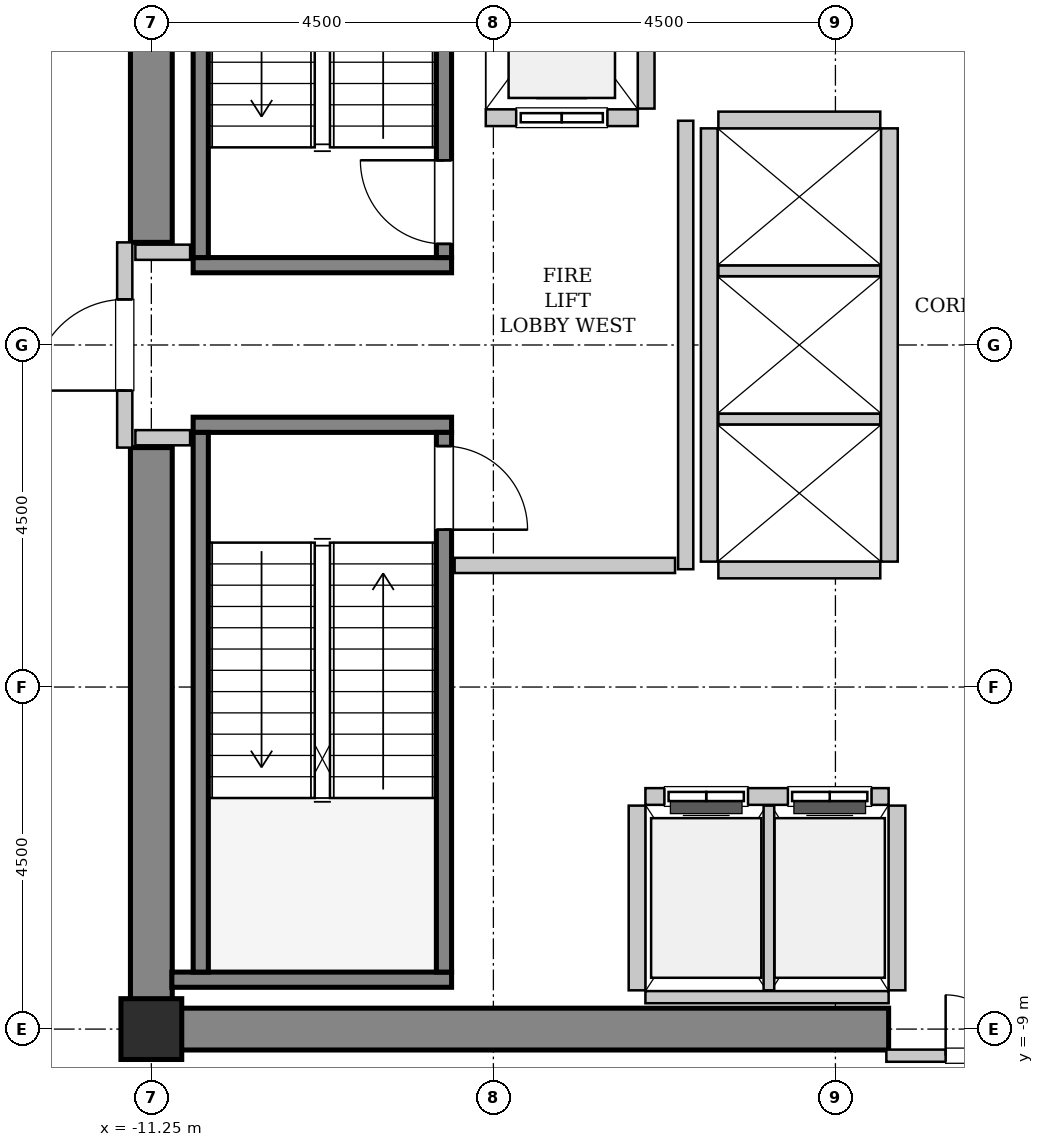
"""IFC4 building model, lengths in metres.
Left out: names, types, materials, properties, quantities, classifications, styles, units other than length and angle.
Written with IfcOpenShell. Run it as: python <this file> out.ifc"""

import sys

from ifc_helpers import new_model, si_unit, direction, frame, frame_2d, origin, origin_2d, place, context, subcontext, project, spatial, rectangle, hollow_rectangle, extrude, source, transform, mapped, element, fill, save


model = new_model("IFC4")
c1 = context("Model", 3, precision=1e-05, world=origin(), true_north=direction((0.0, 1.0)))
c2 = subcontext(c1, "Body", "Model", "MODEL_VIEW")
j1 = project(units=[si_unit("LENGTHUNIT", "METRE"), si_unit("PLANEANGLEUNIT", "RADIAN")], contexts=[c1])
p1 = place(None, origin())
s1 = spatial("IfcSite", under=j1, at=p1, CompositionType="ELEMENT")
p2 = place(p1, origin())
s2 = spatial("IfcBuilding", under=s1, at=p2, CompositionType="ELEMENT")
p3 = place(p2, frame((0.0, 0.0, 202.0)))
s3 = spatial("IfcBuildingStorey", under=s2, at=p3, CompositionType="ELEMENT", Elevation=202.0)
m1 = source(origin(), c2, "Body", "SweptSolid", [
    extrude(rectangle(XDim=9.975, YDim=0.55, at=frame_2d((4.987, 0.0))), origin(), (0.0, 0.0, 1.0), 4.6),
])
p4 = place(p3, frame((-11.525, -9.0, 0.0), z_axis=(0.0, 0.0, 1.0), x_axis=(1.0, 0.0, 0.0)))
e1 = element("IfcWall", 1, at=p4, inside=s3, PredefinedType="SHEAR", context=c2, shape_type="MappedRepresentation", body=[
    mapped(m1, transform((0.0, 0.0, 0.0), x_axis=(1.0, 0.0, 0.0), y_axis=(0.0, 1.0, 0.0), z_axis=(0.0, 0.0, 1.0), scale=1.0)),
])
m2 = source(origin(), c2, "Body", "SweptSolid", [
    extrude(rectangle(XDim=7.375, YDim=0.55, at=frame_2d((3.688, 0.0))), origin(), (0.0, 0.0, 1.0), 4.6),
])
for number, where, z_axis, x_axis in (
    (2, (-11.25, -8.725, 0.0), (0.0, 0.0, 1.0), (0.0, 1.0, 0.0)),
    (3, (-11.25, 1.35, 0.0), (0.0, 0.0, 1.0), (0.0, 1.0, 0.0)),
):
    element("IfcWall", number, at=place(p3, frame(where, z_axis=z_axis, x_axis=x_axis)), inside=s3, PredefinedType="SHEAR", context=c2, shape_type="MappedRepresentation", body=[
        mapped(m2, transform((0.0, 0.0, 0.0), x_axis=(1.0, 0.0, 0.0), y_axis=(0.0, 1.0, 0.0), z_axis=(0.0, 0.0, 1.0), scale=1.0)),
    ])
m3 = source(origin(), c2, "Body", "SweptSolid", [
    extrude(hollow_rectangle(XDim=0.8, YDim=0.8, WallThickness=0.04, InnerFilletRadius=0.04, OuterFilletRadius=0.08, at=origin_2d()), origin(), (0.0, 0.0, 1.0), 4.6),
])
p5 = place(p3, frame((-11.25, -9.0, 0.0), z_axis=(0.0, 0.0, 1.0), x_axis=(1.0, 0.0, 0.0)))
e4 = element("IfcColumn", 4, at=p5, inside=s3, PredefinedType="COLUMN", context=c2, shape_type="MappedRepresentation", body=[
    mapped(m3, transform((0.0, 0.0, 0.0), x_axis=(1.0, 0.0, 0.0), y_axis=(0.0, 1.0, 0.0), z_axis=(0.0, 0.0, 1.0), scale=1.0)),
])
m4 = source(origin(), c2, "Body", "SweptSolid", [
    extrude(rectangle(XDim=3.4, YDim=0.2, at=frame_2d((1.7, 0.0))), origin(), (0.0, 0.0, 1.0), 4.6),
])
p6 = place(p3, frame((-7.3, 1.05, 0.0), z_axis=(0.0, 0.0, 1.0), x_axis=(-1.0, 0.0, 0.0)))
e5 = element("IfcWall", 5, at=p6, inside=s3, PredefinedType="SOLIDWALL", context=c2, shape_type="MappedRepresentation", body=[
    mapped(m4, transform((0.0, 0.0, 0.0), x_axis=(1.0, 0.0, 0.0), y_axis=(0.0, 1.0, 0.0), z_axis=(0.0, 0.0, 1.0), scale=1.0)),
])
m5 = source(origin(), c2, "Body", "SweptSolid", [
    extrude(rectangle(XDim=7.1, YDim=0.2, at=frame_2d((3.55, 0.0))), origin(), (0.0, 0.0, 1.0), 4.6),
])
p7 = place(p3, frame((-7.4, 1.15, 0.0), z_axis=(0.0, 0.0, 1.0), x_axis=(0.0, 1.0, 0.0)))
e6 = element("IfcWall", 6, at=p7, inside=s3, PredefinedType="SOLIDWALL", context=c2, shape_type="MappedRepresentation", body=[
    mapped(m5, transform((0.0, 0.0, 0.0), x_axis=(1.0, 0.0, 0.0), y_axis=(0.0, 1.0, 0.0), z_axis=(0.0, 0.0, 1.0), scale=1.0)),
])
p8 = place(p7, frame((0.18, 0.0, 0.0)))
e7 = element("IfcOpeningElement", 7, at=p8, cuts=e6, PredefinedType="OPENING", context=c2, shape_type="SweptSolid", body=[
    extrude(rectangle(XDim=1.1, YDim=2.15, at=frame_2d((0.55, 1.075))), frame((0.0, 0.11, 0.0), z_axis=(0.0, -1.0, 0.0), x_axis=(1.0, 0.0, 0.0)), (0.0, 0.0, 1.0), 0.22),
])
p9 = place(p3, frame((-10.6, 1.15, 0.0), z_axis=(0.0, 0.0, 1.0), x_axis=(0.0, 1.0, 0.0)))
e8 = element("IfcWall", 8, at=p9, inside=s3, PredefinedType="SOLIDWALL", context=c2, shape_type="MappedRepresentation", body=[
    mapped(m5, transform((0.0, 0.0, 0.0), x_axis=(1.0, 0.0, 0.0), y_axis=(0.0, 1.0, 0.0), z_axis=(0.0, 0.0, 1.0), scale=1.0)),
])
p10 = place(p3, frame((-10.7, -1.05, 0.0), z_axis=(0.0, 0.0, 1.0), x_axis=(1.0, 0.0, 0.0)))
e9 = element("IfcWall", 9, at=p10, inside=s3, PredefinedType="SOLIDWALL", context=c2, shape_type="MappedRepresentation", body=[
    mapped(m4, transform((0.0, 0.0, 0.0), x_axis=(1.0, 0.0, 0.0), y_axis=(0.0, 1.0, 0.0), z_axis=(0.0, 0.0, 1.0), scale=1.0)),
])
m6 = source(origin(), c2, "Body", "SweptSolid", [
    extrude(rectangle(XDim=3.68, YDim=0.2, at=frame_2d((1.84, 0.0))), origin(), (0.0, 0.0, 1.0), 4.6),
])
p11 = place(p3, frame((-10.98, -8.35, 0.0), z_axis=(0.0, 0.0, 1.0), x_axis=(1.0, 0.0, 0.0)))
e10 = element("IfcWall", 10, at=p11, inside=s3, PredefinedType="SOLIDWALL", context=c2, shape_type="MappedRepresentation", body=[
    mapped(m6, transform((0.0, 0.0, 0.0), x_axis=(1.0, 0.0, 0.0), y_axis=(0.0, 1.0, 0.0), z_axis=(0.0, 0.0, 1.0), scale=1.0)),
])
p12 = place(p3, frame((-10.6, -1.15, 0.0), z_axis=(0.0, 0.0, 1.0), x_axis=(0.0, -1.0, 0.0)))
e11 = element("IfcWall", 11, at=p12, inside=s3, PredefinedType="SOLIDWALL", context=c2, shape_type="MappedRepresentation", body=[
    mapped(m5, transform((0.0, 0.0, 0.0), x_axis=(1.0, 0.0, 0.0), y_axis=(0.0, 1.0, 0.0), z_axis=(0.0, 0.0, 1.0), scale=1.0)),
])
p13 = place(p3, frame((-7.4, -1.15, 0.0), z_axis=(0.0, 0.0, 1.0), x_axis=(0.0, -1.0, 0.0)))
e12 = element("IfcWall", 12, at=p13, inside=s3, PredefinedType="SOLIDWALL", context=c2, shape_type="MappedRepresentation", body=[
    mapped(m5, transform((0.0, 0.0, 0.0), x_axis=(1.0, 0.0, 0.0), y_axis=(0.0, 1.0, 0.0), z_axis=(0.0, 0.0, 1.0), scale=1.0)),
])
p14 = place(p13, frame((0.18, 0.0, 0.0)))
e13 = element("IfcOpeningElement", 13, at=p14, cuts=e12, PredefinedType="OPENING", context=c2, shape_type="SweptSolid", body=[
    extrude(rectangle(XDim=1.1, YDim=2.15, at=frame_2d((0.55, 1.075))), frame((0.0, 0.11, 0.0), z_axis=(0.0, -1.0, 0.0), x_axis=(1.0, 0.0, 0.0)), (0.0, 0.0, 1.0), 0.22),
])
m7 = source(origin(), c2, "Body", "SweptSolid", [
    extrude(rectangle(XDim=2.0, YDim=0.22, at=frame_2d((1.0, 0.0))), origin(), (0.0, 0.0, 1.0), 4.335),
])
p15 = place(p3, frame((-6.85, 2.99, 0.0), z_axis=(0.0, 0.0, 1.0), x_axis=(1.0, 0.0, 0.0)))
e14 = element("IfcWall", 14, at=p15, inside=s3, PredefinedType="SOLIDWALL", context=c2, shape_type="MappedRepresentation", body=[
    mapped(m7, transform((0.0, 0.0, 0.0), x_axis=(1.0, 0.0, 0.0), y_axis=(0.0, 1.0, 0.0), z_axis=(0.0, 0.0, 1.0), scale=1.0)),
])
p16 = place(p15, frame((0.4, 0.0, 0.0)))
e15 = element("IfcOpeningElement", 15, at=p16, cuts=e14, PredefinedType="OPENING", context=c2, shape_type="SweptSolid", body=[
    extrude(rectangle(XDim=1.2, YDim=2.2, at=frame_2d((0.6, 1.1))), frame((0.0, 0.12, 0.0), z_axis=(0.0, -1.0, 0.0), x_axis=(1.0, 0.0, 0.0)), (0.0, 0.0, 1.0), 0.24),
])
m8 = source(origin(), c2, "Body", "SweptSolid", [
    extrude(rectangle(XDim=2.68, YDim=0.22, at=frame_2d((1.34, 0.0))), origin(), (0.0, 0.0, 1.0), 4.335),
])
p17 = place(p3, frame((-4.74, 3.11, 0.0), z_axis=(0.0, 0.0, 1.0), x_axis=(0.0, 1.0, 0.0)))
e16 = element("IfcWall", 16, at=p17, inside=s3, PredefinedType="SOLIDWALL", context=c2, shape_type="MappedRepresentation", body=[
    mapped(m8, transform((0.0, 0.0, 0.0), x_axis=(1.0, 0.0, 0.0), y_axis=(0.0, 1.0, 0.0), z_axis=(0.0, 0.0, 1.0), scale=1.0)),
])
m9 = source(origin(), c2, "Body", "SweptSolid", [
    extrude(rectangle(XDim=3.2, YDim=0.22, at=frame_2d((1.6, 0.0))), origin(), (0.0, 0.0, 1.0), 4.335),
])
p18 = place(p3, frame((-1.55, -5.94, 0.0), z_axis=(0.0, 0.0, 1.0), x_axis=(-1.0, 0.0, 0.0)))
e17 = element("IfcWall", 17, at=p18, inside=s3, PredefinedType="SOLIDWALL", context=c2, shape_type="MappedRepresentation", body=[
    mapped(m9, transform((0.0, 0.0, 0.0), x_axis=(1.0, 0.0, 0.0), y_axis=(0.0, 1.0, 0.0), z_axis=(0.0, 0.0, 1.0), scale=1.0)),
])
p19 = place(p18, frame((1.85, 0.0, 0.0)))
e18 = element("IfcOpeningElement", 18, at=p19, cuts=e17, PredefinedType="OPENING", context=c2, shape_type="SweptSolid", body=[
    extrude(rectangle(XDim=1.1, YDim=2.2, at=frame_2d((0.55, 1.1))), frame((0.0, 0.12, 0.0), z_axis=(0.0, -1.0, 0.0), x_axis=(1.0, 0.0, 0.0)), (0.0, 0.0, 1.0), 0.24),
])
p20 = place(p18, frame((0.225, 0.0, 0.0)))
e19 = element("IfcOpeningElement", 19, at=p20, cuts=e17, PredefinedType="OPENING", context=c2, shape_type="SweptSolid", body=[
    extrude(rectangle(XDim=1.1, YDim=2.2, at=frame_2d((0.55, 1.1))), frame((0.0, 0.12, 0.0), z_axis=(0.0, -1.0, 0.0), x_axis=(1.0, 0.0, 0.0)), (0.0, 0.0, 1.0), 0.24),
])
m10 = source(origin(), c2, "Body", "SweptSolid", [
    extrude(rectangle(XDim=3.2, YDim=0.16, at=frame_2d((1.6, 0.0))), origin(), (0.0, 0.0, 1.0), 3.225),
])
p21 = place(p3, frame((-4.75, -8.58, 0.0), z_axis=(0.0, 0.0, 1.0), x_axis=(1.0, 0.0, 0.0)))
e20 = element("IfcWall", 20, at=p21, inside=s3, PredefinedType="PARTITIONING", context=c2, shape_type="MappedRepresentation", body=[
    mapped(m10, transform((0.0, 0.0, 0.0), x_axis=(1.0, 0.0, 0.0), y_axis=(0.0, 1.0, 0.0), z_axis=(0.0, 0.0, 1.0), scale=1.0)),
])
m11 = source(origin(), c2, "Body", "SweptSolid", [
    extrude(rectangle(XDim=2.43, YDim=0.22, at=frame_2d((1.215, 0.0))), origin(), (0.0, 0.0, 1.0), 4.335),
])
p22 = place(p3, frame((-4.86, -6.06, 0.0), z_axis=(0.0, 0.0, 1.0), x_axis=(0.0, -1.0, 0.0)))
e21 = element("IfcWall", 21, at=p22, inside=s3, PredefinedType="SOLIDWALL", context=c2, shape_type="MappedRepresentation", body=[
    mapped(m11, transform((0.0, 0.0, 0.0), x_axis=(1.0, 0.0, 0.0), y_axis=(0.0, 1.0, 0.0), z_axis=(0.0, 0.0, 1.0), scale=1.0)),
])
m12 = source(origin(), c2, "Body", "SweptSolid", [
    extrude(rectangle(XDim=2.43, YDim=0.14, at=frame_2d((1.215, 0.0))), origin(), (0.0, 0.0, 1.0), 4.335),
])
p23 = place(p3, frame((-3.125, -8.49, 0.0), z_axis=(0.0, 0.0, 1.0), x_axis=(0.0, 1.0, 0.0)))
e22 = element("IfcWall", 22, at=p23, inside=s3, PredefinedType="PARTITIONING", context=c2, shape_type="MappedRepresentation", body=[
    mapped(m12, transform((0.0, 0.0, 0.0), x_axis=(1.0, 0.0, 0.0), y_axis=(0.0, 1.0, 0.0), z_axis=(0.0, 0.0, 1.0), scale=1.0)),
])
p24 = place(p3, frame((-1.44, -8.49, 0.0), z_axis=(0.0, 0.0, 1.0), x_axis=(0.0, 1.0, 0.0)))
e23 = element("IfcWall", 23, at=p24, inside=s3, PredefinedType="SOLIDWALL", context=c2, shape_type="MappedRepresentation", body=[
    mapped(m11, transform((0.0, 0.0, 0.0), x_axis=(1.0, 0.0, 0.0), y_axis=(0.0, 1.0, 0.0), z_axis=(0.0, 0.0, 1.0), scale=1.0)),
])
m13 = source(origin(), c2, "Body", "SweptSolid", [
    extrude(rectangle(XDim=5.7, YDim=0.22, at=frame_2d((2.85, 0.0))), origin(), (0.0, 0.0, 1.0), 4.335),
])
for number, where, z_axis, x_axis in (
    (24, (-1.54, -2.85, 0.0), (0.0, 0.0, 1.0), (0.0, 1.0, 0.0)),
    (25, (-3.91, 2.85, 0.0), (0.0, 0.0, 1.0), (0.0, -1.0, 0.0)),
):
    element("IfcWall", number, at=place(p3, frame(where, z_axis=z_axis, x_axis=x_axis)), inside=s3, PredefinedType="SOLIDWALL", context=c2, shape_type="MappedRepresentation", body=[
        mapped(m13, transform((0.0, 0.0, 0.0), x_axis=(1.0, 0.0, 0.0), y_axis=(0.0, 1.0, 0.0), z_axis=(0.0, 0.0, 1.0), scale=1.0)),
    ])
m14 = source(origin(), c2, "Body", "SweptSolid", [
    extrude(rectangle(XDim=2.13, YDim=0.22, at=frame_2d((1.065, 0.0))), origin(), (0.0, 0.0, 1.0), 4.335),
])
p25 = place(p3, frame((-3.79, -2.96, 0.0), z_axis=(0.0, 0.0, 1.0), x_axis=(1.0, 0.0, 0.0)))
e26 = element("IfcWall", 26, at=p25, inside=s3, PredefinedType="SOLIDWALL", context=c2, shape_type="MappedRepresentation", body=[
    mapped(m14, transform((0.0, 0.0, 0.0), x_axis=(1.0, 0.0, 0.0), y_axis=(0.0, 1.0, 0.0), z_axis=(0.0, 0.0, 1.0), scale=1.0)),
])
m15 = source(origin(), c2, "Body", "SweptSolid", [
    extrude(rectangle(XDim=2.13, YDim=0.14, at=frame_2d((1.065, 0.0))), origin(), (0.0, 0.0, 1.0), 4.335),
])
for number, where, z_axis, x_axis in (
    (27, (-3.79, -0.975, 0.0), (0.0, 0.0, 1.0), (1.0, 0.0, 0.0)),
    (28, (-3.79, 0.975, 0.0), (0.0, 0.0, 1.0), (1.0, 0.0, 0.0)),
):
    element("IfcWall", number, at=place(p3, frame(where, z_axis=z_axis, x_axis=x_axis)), inside=s3, PredefinedType="PARTITIONING", context=c2, shape_type="MappedRepresentation", body=[
        mapped(m15, transform((0.0, 0.0, 0.0), x_axis=(1.0, 0.0, 0.0), y_axis=(0.0, 1.0, 0.0), z_axis=(0.0, 0.0, 1.0), scale=1.0)),
    ])
p26 = place(p3, frame((-1.66, 2.96, 0.0), z_axis=(0.0, 0.0, 1.0), x_axis=(-1.0, 0.0, 0.0)))
e29 = element("IfcWall", 29, at=p26, inside=s3, PredefinedType="SOLIDWALL", context=c2, shape_type="MappedRepresentation", body=[
    mapped(m14, transform((0.0, 0.0, 0.0), x_axis=(1.0, 0.0, 0.0), y_axis=(0.0, 1.0, 0.0), z_axis=(0.0, 0.0, 1.0), scale=1.0)),
])
m16 = source(origin(), c2, "Body", "SweptSolid", [
    extrude(rectangle(XDim=2.7, YDim=0.2, at=frame_2d((1.35, 0.0))), origin(), (0.0, 0.0, 1.0), 3.225),
])
p27 = place(p3, frame((-11.6, -1.35, 0.0), z_axis=(0.0, 0.0, 1.0), x_axis=(0.0, 1.0, 0.0)))
e30 = element("IfcWall", 30, at=p27, inside=s3, PredefinedType="PARTITIONING", context=c2, shape_type="MappedRepresentation", body=[
    mapped(m16, transform((0.0, 0.0, 0.0), x_axis=(1.0, 0.0, 0.0), y_axis=(0.0, 1.0, 0.0), z_axis=(0.0, 0.0, 1.0), scale=1.0)),
])
p28 = place(p27, frame((0.75, 0.0, 0.0)))
e31 = element("IfcOpeningElement", 31, at=p28, cuts=e30, PredefinedType="OPENING", context=c2, shape_type="SweptSolid", body=[
    extrude(rectangle(XDim=1.2, YDim=2.15, at=frame_2d((0.6, 1.075))), frame((0.0, 0.11, 0.0), z_axis=(0.0, -1.0, 0.0), x_axis=(1.0, 0.0, 0.0)), (0.0, 0.0, 1.0), 0.22),
])
m17 = source(origin(), c2, "Body", "SweptSolid", [
    extrude(rectangle(XDim=5.9, YDim=0.2, at=frame_2d((2.95, 0.0))), origin(), (0.0, 0.0, 1.0), 4.335),
])
p29 = place(p3, frame((-4.22, -2.95, 0.0), z_axis=(0.0, 0.0, 1.0), x_axis=(0.0, 1.0, 0.0)))
e32 = element("IfcWall", 32, at=p29, inside=s3, PredefinedType="PARTITIONING", context=c2, shape_type="MappedRepresentation", body=[
    mapped(m17, transform((0.0, 0.0, 0.0), x_axis=(1.0, 0.0, 0.0), y_axis=(0.0, 1.0, 0.0), z_axis=(0.0, 0.0, 1.0), scale=1.0)),
])
m18 = source(origin(), c2, "Body", "SweptSolid", [
    extrude(rectangle(XDim=2.9, YDim=0.2, at=frame_2d((1.45, 0.0))), origin(), (0.0, 0.0, 1.0), 4.335),
])
p30 = place(p3, frame((-7.26, -2.9, 0.0), z_axis=(0.0, 0.0, 1.0), x_axis=(1.0, 0.0, 0.0)))
e33 = element("IfcWall", 33, at=p30, inside=s3, PredefinedType="PARTITIONING", context=c2, shape_type="MappedRepresentation", body=[
    mapped(m18, transform((0.0, 0.0, 0.0), x_axis=(1.0, 0.0, 0.0), y_axis=(0.0, 1.0, 0.0), z_axis=(0.0, 0.0, 1.0), scale=1.0)),
])
m19 = source(origin(), c2, "Body", "SweptSolid", [
    extrude(rectangle(XDim=0.72, YDim=0.2, at=frame_2d((0.36, 0.0))), origin(), (0.0, 0.0, 1.0), 4.335),
])
for number, where, z_axis, x_axis in (
    (34, (-11.46, 1.22, 0.0), (0.0, 0.0, 1.0), (1.0, 0.0, 0.0)),
    (35, (-11.46, -1.22, 0.0), (0.0, 0.0, 1.0), (1.0, 0.0, 0.0)),
):
    element("IfcWall", number, at=place(p3, frame(where, z_axis=z_axis, x_axis=x_axis)), inside=s3, PredefinedType="PARTITIONING", context=c2, shape_type="MappedRepresentation", body=[
        mapped(m19, transform((0.0, 0.0, 0.0), x_axis=(1.0, 0.0, 0.0), y_axis=(0.0, 1.0, 0.0), z_axis=(0.0, 0.0, 1.0), scale=1.0)),
    ])
m20 = source(origin(), c2, "Body", "SweptSolid", [
    extrude(rectangle(XDim=3.16, YDim=0.16, at=frame_2d((1.58, 0.0))), origin(), (0.0, 0.0, 1.0), 3.225),
])
p31 = place(p3, frame((-1.58, -9.35, 0.0), z_axis=(0.0, 0.0, 1.0), x_axis=(1.0, 0.0, 0.0)))
e36 = element("IfcWall", 36, at=p31, inside=s3, PredefinedType="PARTITIONING", context=c2, shape_type="MappedRepresentation", body=[
    mapped(m20, transform((0.0, 0.0, 0.0), x_axis=(1.0, 0.0, 0.0), y_axis=(0.0, 1.0, 0.0), z_axis=(0.0, 0.0, 1.0), scale=1.0)),
])
p32 = place(p31, frame((0.78, 0.0, 0.0)))
e37 = element("IfcOpeningElement", 37, at=p32, cuts=e36, PredefinedType="OPENING", context=c2, shape_type="SweptSolid", body=[
    extrude(rectangle(XDim=1.6, YDim=2.3, at=frame_2d((0.8, 1.15))), frame((0.0, 0.09, 0.0), z_axis=(0.0, -1.0, 0.0), x_axis=(1.0, 0.0, 0.0)), (0.0, 0.0, 1.0), 0.18),
])
m21 = source(origin(), c2, "Body", "SweptSolid", [
    extrude(rectangle(XDim=1.1, YDim=2.15, at=frame_2d((0.55, 1.075))), frame((0.0, 0.025, 0.0), z_axis=(0.0, -1.0, 0.0), x_axis=(1.0, 0.0, 0.0)), (0.0, 0.0, 1.0), 0.05),
])
p33 = place(p8, origin())
e38 = element("IfcDoor", 38, at=p33, inside=s3, OperationType="SINGLE_SWING_RIGHT", PredefinedType="DOOR", context=c2, shape_type="MappedRepresentation", body=[
    mapped(m21, transform((0.0, 0.0, 0.0), x_axis=(1.0, 0.0, 0.0), y_axis=(0.0, 1.0, 0.0), z_axis=(0.0, 0.0, 1.0), scale=1.0)),
])
fill(e7, e38)
p34 = place(p14, origin())
e39 = element("IfcDoor", 39, at=p34, inside=s3, OperationType="SINGLE_SWING_RIGHT", PredefinedType="DOOR", context=c2, shape_type="MappedRepresentation", body=[
    mapped(m21, transform((0.0, 0.0, 0.0), x_axis=(1.0, 0.0, 0.0), y_axis=(0.0, 1.0, 0.0), z_axis=(0.0, 0.0, 1.0), scale=1.0)),
])
fill(e13, e39)
m22 = source(origin(), c2, "Body", "SweptSolid", [
    extrude(rectangle(XDim=1.2, YDim=2.2, at=frame_2d((0.6, 1.1))), frame((0.0, 0.025, 0.0), z_axis=(0.0, -1.0, 0.0), x_axis=(1.0, 0.0, 0.0)), (0.0, 0.0, 1.0), 0.05),
])
p35 = place(p16, origin())
e40 = element("IfcDoor", 40, at=p35, inside=s3, OperationType="SLIDING_TO_LEFT", PredefinedType="DOOR", context=c2, shape_type="MappedRepresentation", body=[
    mapped(m22, transform((0.0, 0.0, 0.0), x_axis=(1.0, 0.0, 0.0), y_axis=(0.0, 1.0, 0.0), z_axis=(0.0, 0.0, 1.0), scale=1.0)),
])
fill(e15, e40)
m23 = source(origin(), c2, "Body", "SweptSolid", [
    extrude(rectangle(XDim=1.1, YDim=2.2, at=frame_2d((0.55, 1.1))), frame((0.0, 0.025, 0.0), z_axis=(0.0, -1.0, 0.0), x_axis=(1.0, 0.0, 0.0)), (0.0, 0.0, 1.0), 0.05),
])
p36 = place(p19, origin())
e41 = element("IfcDoor", 41, at=p36, inside=s3, OperationType="DOUBLE_DOOR_SLIDING", PredefinedType="DOOR", context=c2, shape_type="MappedRepresentation", body=[
    mapped(m23, transform((0.0, 0.0, 0.0), x_axis=(1.0, 0.0, 0.0), y_axis=(0.0, 1.0, 0.0), z_axis=(0.0, 0.0, 1.0), scale=1.0)),
])
fill(e18, e41)
p37 = place(p20, origin())
e42 = element("IfcDoor", 42, at=p37, inside=s3, OperationType="DOUBLE_DOOR_SLIDING", PredefinedType="DOOR", context=c2, shape_type="MappedRepresentation", body=[
    mapped(m23, transform((0.0, 0.0, 0.0), x_axis=(1.0, 0.0, 0.0), y_axis=(0.0, 1.0, 0.0), z_axis=(0.0, 0.0, 1.0), scale=1.0)),
])
fill(e19, e42)
m24 = source(origin(), c2, "Body", "SweptSolid", [
    extrude(rectangle(XDim=1.2, YDim=2.15, at=frame_2d((0.6, 1.075))), frame((0.0, 0.025, 0.0), z_axis=(0.0, -1.0, 0.0), x_axis=(1.0, 0.0, 0.0)), (0.0, 0.0, 1.0), 0.05),
])
p38 = place(p28, origin())
e43 = element("IfcDoor", 43, at=p38, inside=s3, OperationType="SINGLE_SWING_LEFT", PredefinedType="DOOR", context=c2, shape_type="MappedRepresentation", body=[
    mapped(m24, transform((0.0, 0.0, 0.0), x_axis=(1.0, 0.0, 0.0), y_axis=(0.0, 1.0, 0.0), z_axis=(0.0, 0.0, 1.0), scale=1.0)),
])
fill(e31, e43)
m25 = source(origin(), c2, "Body", "SweptSolid", [
    extrude(rectangle(XDim=1.6, YDim=2.3, at=frame_2d((0.8, 1.15))), frame((0.0, 0.025, 0.0), z_axis=(0.0, -1.0, 0.0), x_axis=(1.0, 0.0, 0.0)), (0.0, 0.0, 1.0), 0.05),
])
p39 = place(p32, origin())
e44 = element("IfcDoor", 44, at=p39, inside=s3, OperationType="DOUBLE_DOOR_SINGLE_SWING", PredefinedType="DOOR", context=c2, shape_type="MappedRepresentation", body=[
    mapped(m25, transform((0.0, 0.0, 0.0), x_axis=(1.0, 0.0, 0.0), y_axis=(0.0, 1.0, 0.0), z_axis=(0.0, 0.0, 1.0), scale=1.0)),
])
fill(e37, e44)
save(model, sys.argv[1])
